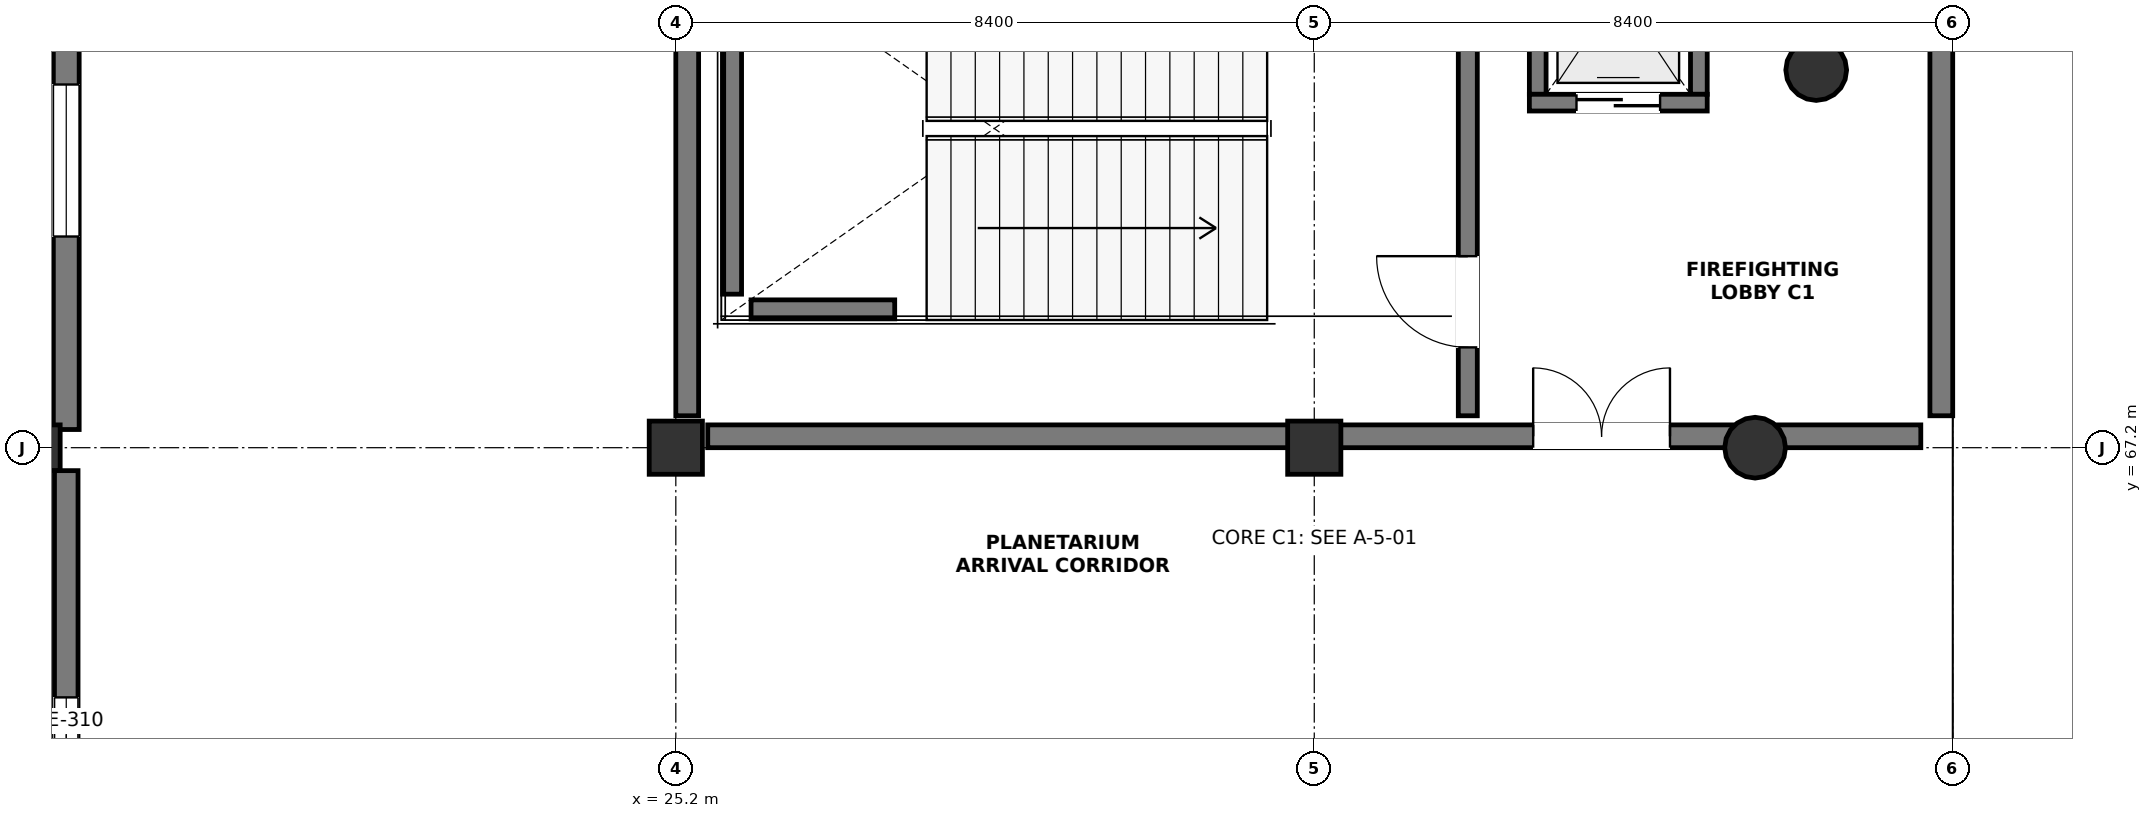
"""IFC4 building model, lengths in metres.
Left out: names, types, materials, properties, quantities, classifications, styles, units other than length and angle.
Written with IfcOpenShell. Run it as: python <this file> out.ifc"""

import sys

from ifc_helpers import new_model, si_unit, direction, frame, frame_2d, origin, origin_2d, place, context, subcontext, project, spatial, rectangle, circle, extrude, element, fill, save


model = new_model("IFC4")
c1 = context("Model", 3, precision=1e-05, world=origin(), true_north=direction((0.0, 1.0)))
c2 = subcontext(c1, "Body", "Model", "MODEL_VIEW")
j1 = project(units=[si_unit("LENGTHUNIT", "METRE"), si_unit("PLANEANGLEUNIT", "RADIAN")], contexts=[c1])
p1 = place(None, origin())
s1 = spatial("IfcSite", under=j1, at=p1, CompositionType="ELEMENT")
p2 = place(p1, origin())
s2 = spatial("IfcBuilding", under=s1, at=p2, CompositionType="ELEMENT")
p3 = place(p2, origin())
s3 = spatial("IfcBuildingStorey", under=s2, at=p3, CompositionType="ELEMENT", Elevation=0.0)
for number, where, z_axis, x_axis in (
    (1, (40.204, 72.169, 0.0), (0.0, 0.0, 1.0), (1.0, 0.0, 0.0)),
    (2, (39.4, 67.2, 0.0), (0.0, 0.0, 1.0), (1.0, 0.0, 0.0)),
):
    element("IfcColumn", number, at=place(p3, frame(where, z_axis=z_axis, x_axis=x_axis)), inside=s3, PredefinedType="COLUMN", context=c2, shape_type="SweptSolid", body=[
        extrude(circle(Radius=0.4, at=origin_2d()), origin(), (0.0, 0.0, 1.0), 5.1),
    ])
p4 = place(p3, frame((16.8, 67.2, 0.0), z_axis=(0.0, 0.0, 1.0), x_axis=(1.0, 0.0, 0.0)))
e3 = element("IfcColumn", 3, at=p4, inside=s3, PredefinedType="COLUMN", context=c2, shape_type="SweptSolid", body=[
    extrude(rectangle(XDim=0.6, YDim=0.6, at=origin_2d()), origin(), (0.0, 0.0, 1.0), 5.1),
])
for number, where, z_axis, x_axis in (
    (4, (25.2, 67.2, 0.0), (0.0, 0.0, 1.0), (1.0, 0.0, 0.0)),
    (5, (33.6, 67.2, 0.0), (0.0, 0.0, 1.0), (1.0, 0.0, 0.0)),
):
    element("IfcColumn", number, at=place(p3, frame(where, z_axis=z_axis, x_axis=x_axis)), inside=s3, PredefinedType="COLUMN", context=c2, shape_type="SweptSolid", body=[
        extrude(rectangle(XDim=0.7, YDim=0.7, at=origin_2d()), origin(), (0.0, 0.0, 1.0), 5.1),
    ])
p5 = place(p3, frame((17.18, 59.18, 0.0), z_axis=(0.0, 0.0, 1.0), x_axis=(0.0, 1.0, 0.0)))
e6 = element("IfcWall", 6, at=p5, inside=s3, PredefinedType="SOLIDWALL", context=c2, shape_type="SweptSolid", body=[
    extrude(rectangle(XDim=7.718, YDim=0.31, at=frame_2d((3.859, 0.0))), origin(), (0.0, 0.0, 1.0), 3.9),
])
p6 = place(p5, frame((2.935, 0.0, 0.85)))
e7 = element("IfcOpeningElement", 7, at=p6, cuts=e6, PredefinedType="OPENING", context=c2, shape_type="SweptSolid", body=[
    extrude(rectangle(XDim=1.8, YDim=1.4, at=frame_2d((0.9, 0.7))), frame((0.0, 0.167, 0.0), z_axis=(0.0, -1.0, 0.0), x_axis=(1.0, 0.0, 0.0)), (0.0, 0.0, 1.0), 0.334),
])
p7 = place(p3, frame((17.18, 67.439, 0.0), z_axis=(0.0, 0.0, 1.0), x_axis=(0.0, 1.0, 0.0)))
e8 = element("IfcWall", 8, at=p7, inside=s3, PredefinedType="SOLIDWALL", context=c2, shape_type="SweptSolid", body=[
    extrude(rectangle(XDim=7.079, YDim=0.34, at=frame_2d((3.54, 0.0))), origin(), (0.0, 0.0, 1.0), 3.9),
])
p8 = place(p7, frame((2.54, 0.0, 0.85)))
e9 = element("IfcOpeningElement", 9, at=p8, cuts=e8, PredefinedType="OPENING", context=c2, shape_type="SweptSolid", body=[
    extrude(rectangle(XDim=2.0, YDim=1.4, at=frame_2d((1.0, 0.7))), frame((0.0, 0.182, 0.0), z_axis=(0.0, -1.0, 0.0), x_axis=(1.0, 0.0, 0.0)), (0.0, 0.0, 1.0), 0.364),
])
p9 = place(p3, frame((25.62, 67.35, 0.0), z_axis=(0.0, 0.0, 1.0), x_axis=(1.0, 0.0, 0.0)))
e10 = element("IfcWall", 10, at=p9, inside=s3, PredefinedType="SHEAR", context=c2, shape_type="SweptSolid", body=[
    extrude(rectangle(XDim=15.96, YDim=0.3, at=frame_2d((7.98, 0.0))), origin(), (0.0, 0.0, 1.0), 4.7),
])
p10 = place(p9, frame((10.86, 0.0, 0.0)))
e11 = element("IfcOpeningElement", 11, at=p10, cuts=e10, PredefinedType="OPENING", context=c2, shape_type="SweptSolid", body=[
    extrude(rectangle(XDim=1.8, YDim=2.2, at=frame_2d((0.9, 1.1))), frame((0.0, 0.162, 0.0), z_axis=(0.0, -1.0, 0.0), x_axis=(1.0, 0.0, 0.0)), (0.0, 0.0, 1.0), 0.324),
])
for number, where, z_axis, x_axis in (
    (12, (25.35, 67.62, 0.0), (0.0, 0.0, 1.0), (0.0, 1.0, 0.0)),
    (13, (41.85, 67.62, 0.0), (0.0, 0.0, 1.0), (0.0, 1.0, 0.0)),
):
    element("IfcWall", number, at=place(p3, frame(where, z_axis=z_axis, x_axis=x_axis)), inside=s3, PredefinedType="SHEAR", context=c2, shape_type="SweptSolid", body=[
        extrude(rectangle(XDim=7.56, YDim=0.3, at=frame_2d((3.78, 0.0))), origin(), (0.0, 0.0, 1.0), 4.7),
    ])
p11 = place(p3, frame((25.94, 69.22, 0.0), z_axis=(0.0, 0.0, 1.0), x_axis=(0.0, 1.0, 0.0)))
e14 = element("IfcWall", 14, at=p11, inside=s3, PredefinedType="SHEAR", context=c2, shape_type="SweptSolid", body=[
    extrude(rectangle(XDim=4.36, YDim=0.25, at=frame_2d((2.18, 0.0))), origin(), (0.0, 0.0, 1.0), 4.7),
])
p12 = place(p3, frame((26.19, 69.02, 0.0), z_axis=(0.0, 0.0, 1.0), x_axis=(1.0, 0.0, 0.0)))
e15 = element("IfcWall", 15, at=p12, inside=s3, PredefinedType="SHEAR", context=c2, shape_type="SweptSolid", body=[
    extrude(rectangle(XDim=1.89, YDim=0.25, at=frame_2d((0.945, 0.0))), origin(), (0.0, 0.0, 1.0), 4.7),
])
p13 = place(p3, frame((35.62, 67.62, 0.0), z_axis=(0.0, 0.0, 1.0), x_axis=(0.0, 1.0, 0.0)))
e16 = element("IfcWall", 16, at=p13, inside=s3, PredefinedType="SHEAR", context=c2, shape_type="SweptSolid", body=[
    extrude(rectangle(XDim=7.56, YDim=0.25, at=frame_2d((3.78, 0.0))), origin(), (0.0, 0.0, 1.0), 4.7),
])
p14 = place(p13, frame((0.9, 0.0, 0.0)))
e17 = element("IfcOpeningElement", 17, at=p14, cuts=e16, PredefinedType="OPENING", context=c2, shape_type="SweptSolid", body=[
    extrude(rectangle(XDim=1.2, YDim=2.2, at=frame_2d((0.6, 1.1))), frame((0.0, 0.137, 0.0), z_axis=(0.0, -1.0, 0.0), x_axis=(1.0, 0.0, 0.0)), (0.0, 0.0, 1.0), 0.274),
])
for number, where, z_axis, x_axis in (
    (18, (36.54, 71.85, 0.0), (0.0, 0.0, 1.0), (0.0, 1.0, 0.0)),
    (19, (38.66, 71.85, 0.0), (0.0, 0.0, 1.0), (0.0, 1.0, 0.0)),
):
    element("IfcWall", number, at=place(p3, frame(where, z_axis=z_axis, x_axis=x_axis)), inside=s3, PredefinedType="SOLIDWALL", context=c2, shape_type="SweptSolid", body=[
        extrude(rectangle(XDim=2.7, YDim=0.22, at=frame_2d((1.35, 0.0))), origin(), (0.0, 0.0, 1.0), 4.7),
    ])
p15 = place(p3, frame((36.43, 71.74, 0.0), z_axis=(0.0, 0.0, 1.0), x_axis=(1.0, 0.0, 0.0)))
e20 = element("IfcWall", 20, at=p15, inside=s3, PredefinedType="SOLIDWALL", context=c2, shape_type="SweptSolid", body=[
    extrude(rectangle(XDim=2.34, YDim=0.22, at=frame_2d((1.17, 0.0))), origin(), (0.0, 0.0, 1.0), 4.7),
])
p16 = place(p15, frame((0.62, 0.0, 0.0)))
e21 = element("IfcOpeningElement", 21, at=p16, cuts=e20, PredefinedType="OPENING", context=c2, shape_type="SweptSolid", body=[
    extrude(rectangle(XDim=1.1, YDim=2.15, at=frame_2d((0.55, 1.075))), frame((0.0, 0.122, 0.0), z_axis=(0.0, -1.0, 0.0), x_axis=(1.0, 0.0, 0.0)), (0.0, 0.0, 1.0), 0.244),
])
p17 = place(p6, origin())
e22 = element("IfcWindow", 22, at=p17, inside=s3, PartitioningType="SINGLE_PANEL", PredefinedType="WINDOW", context=c2, shape_type="SweptSolid", body=[
    extrude(rectangle(XDim=1.8, YDim=1.4, at=frame_2d((0.9, 0.7))), frame((0.0, 0.03, 0.0), z_axis=(0.0, -1.0, 0.0), x_axis=(1.0, 0.0, 0.0)), (0.0, 0.0, 1.0), 0.06),
])
fill(e7, e22)
p18 = place(p8, origin())
e23 = element("IfcWindow", 23, at=p18, inside=s3, PartitioningType="SINGLE_PANEL", PredefinedType="WINDOW", context=c2, shape_type="SweptSolid", body=[
    extrude(rectangle(XDim=2.0, YDim=1.4, at=frame_2d((1.0, 0.7))), frame((0.0, 0.03, 0.0), z_axis=(0.0, -1.0, 0.0), x_axis=(1.0, 0.0, 0.0)), (0.0, 0.0, 1.0), 0.06),
])
fill(e9, e23)
p19 = place(p10, origin())
e24 = element("IfcDoor", 24, at=p19, inside=s3, OperationType="DOUBLE_DOOR_SINGLE_SWING", PredefinedType="DOOR", context=c2, shape_type="SweptSolid", body=[
    extrude(rectangle(XDim=1.8, YDim=2.2, at=frame_2d((0.9, 1.1))), frame((0.0, 0.025, 0.0), z_axis=(0.0, -1.0, 0.0), x_axis=(1.0, 0.0, 0.0)), (0.0, 0.0, 1.0), 0.05),
])
fill(e11, e24)
p20 = place(p14, origin())
e25 = element("IfcDoor", 25, at=p20, inside=s3, OperationType="SINGLE_SWING_RIGHT", PredefinedType="DOOR", context=c2, shape_type="SweptSolid", body=[
    extrude(rectangle(XDim=1.2, YDim=2.2, at=frame_2d((0.6, 1.1))), frame((0.0, 0.025, 0.0), z_axis=(0.0, -1.0, 0.0), x_axis=(1.0, 0.0, 0.0)), (0.0, 0.0, 1.0), 0.05),
])
fill(e17, e25)
p21 = place(p16, origin())
e26 = element("IfcDoor", 26, at=p21, inside=s3, OperationType="DOUBLE_DOOR_SLIDING", PredefinedType="DOOR", context=c2, shape_type="SweptSolid", body=[
    extrude(rectangle(XDim=1.1, YDim=2.15, at=frame_2d((0.55, 1.075))), frame((0.0, 0.025, 0.0), z_axis=(0.0, -1.0, 0.0), x_axis=(1.0, 0.0, 0.0)), (0.0, 0.0, 1.0), 0.05),
])
fill(e21, e26)
save(model, sys.argv[1])
